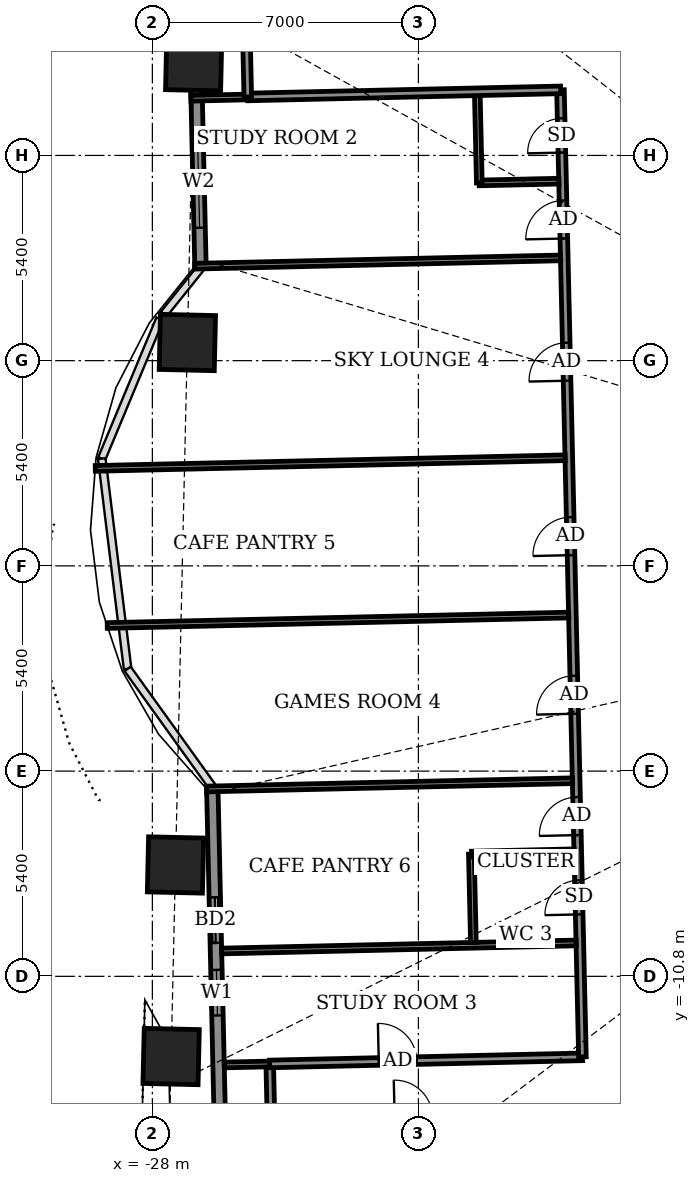
"""IFC4 building model, lengths in metres.
Left out: names, types, materials, properties, quantities, classifications, styles, units other than length and angle.
Written with IfcOpenShell. Run it as: python <this file> out.ifc"""

import sys

from ifc_helpers import new_model, si_unit, direction, frame, frame_2d, origin, origin_2d, place, context, subcontext, project, spatial, rectangle, extrude, element, fill, save


model = new_model("IFC4")
c1 = context("Model", 3, precision=1e-05, world=origin(), true_north=direction((0.0, 1.0)))
c2 = subcontext(c1, "Body", "Model", "MODEL_VIEW")
j1 = project(units=[si_unit("LENGTHUNIT", "METRE"), si_unit("PLANEANGLEUNIT", "RADIAN")], contexts=[c1])
p1 = place(None, origin())
s1 = spatial("IfcSite", under=j1, at=p1, CompositionType="ELEMENT")
p2 = place(p1, origin())
s2 = spatial("IfcBuilding", under=s1, at=p2, CompositionType="ELEMENT")
p3 = place(p2, frame((0.0, 0.0, 74.7)))
s3 = spatial("IfcBuildingStorey", under=s2, at=p3, CompositionType="ELEMENT", Elevation=74.7)
for number, where, z_axis, x_axis in (
    (1, (-27.391, -7.869, -0.55), (0.0, 0.0, 1.0), (-0.023, -1.0, 0.0)),
    (2, (-27.506, -12.909, -0.55), (0.0, 0.0, 1.0), (-0.023, -1.0, 0.0)),
    (3, (-26.912, 13.239, -0.55), (0.0, 0.0, 1.0), (-0.023, -1.0, 0.0)),
    (4, (-27.079, 5.877, -0.55), (0.0, 0.0, 1.0), (-0.023, -1.0, 0.0)),
):
    element("IfcColumn", number, at=place(p3, frame(where, z_axis=z_axis, x_axis=x_axis)), inside=s3, PredefinedType="COLUMN", context=c2, shape_type="SweptSolid", body=[
        extrude(rectangle(XDim=1.45, YDim=1.45, at=origin_2d()), origin(), (0.0, 0.0, 1.0), 4.6),
    ])
p4 = place(p3, frame((-27.036, 21.155, 0.0), z_axis=(0.0, 0.0, 1.0), x_axis=(0.022730142562, -0.999741636934, 0.0)))
e5 = element("IfcWall", 5, at=p4, inside=s3, PredefinedType="SOLIDWALL", context=c2, shape_type="SweptSolid", body=[
    extrude(rectangle(XDim=13.329, YDim=0.3, at=frame_2d((6.665, 0.0))), origin(), (0.0, 0.0, 1.0), 2.45),
])
p5 = place(p4, frame((3.813, 0.0, 0.0)))
e6 = element("IfcOpeningElement", 6, at=p5, cuts=e5, PredefinedType="OPENING", context=c2, shape_type="SweptSolid", body=[
    extrude(rectangle(XDim=1.5, YDim=2.4, at=frame_2d((0.75, 1.2))), frame((0.0, 0.16, 0.0), z_axis=(0.0, -1.0, 0.0), x_axis=(1.0, 0.0, 0.0)), (0.0, 0.0, 1.0), 0.32),
])
p6 = place(p4, frame((9.862, 0.0, 0.9)))
e7 = element("IfcOpeningElement", 7, at=p6, cuts=e5, PredefinedType="OPENING", context=c2, shape_type="SweptSolid", body=[
    extrude(rectangle(XDim=2.4, YDim=1.5, at=frame_2d((1.2, 0.75))), frame((0.0, 0.16, 0.0), z_axis=(0.0, -1.0, 0.0), x_axis=(1.0, 0.0, 0.0)), (0.0, 0.0, 1.0), 0.32),
])
p7 = place(p3, frame((-26.424, -5.808, 0.0), z_axis=(0.0, 0.0, 1.0), x_axis=(0.022654755793, -0.999743348085, 0.0)))
e8 = element("IfcWall", 8, at=p7, inside=s3, PredefinedType="SOLIDWALL", context=c2, shape_type="SweptSolid", body=[
    extrude(rectangle(XDim=13.729, YDim=0.3, at=frame_2d((6.865, 0.0))), origin(), (0.0, 0.0, 1.0), 2.45),
])
p8 = place(p7, frame((2.913, 0.0, 0.0)))
e9 = element("IfcOpeningElement", 9, at=p8, cuts=e8, PredefinedType="OPENING", context=c2, shape_type="SweptSolid", body=[
    extrude(rectangle(XDim=1.2, YDim=2.4, at=frame_2d((0.6, 1.2))), frame((0.0, 0.16, 0.0), z_axis=(0.0, -1.0, 0.0), x_axis=(1.0, 0.0, 0.0)), (0.0, 0.0, 1.0), 0.32),
])
p9 = place(p7, frame((4.823, 0.0, 0.9)))
e10 = element("IfcOpeningElement", 10, at=p9, cuts=e8, PredefinedType="OPENING", context=c2, shape_type="SweptSolid", body=[
    extrude(rectangle(XDim=1.2, YDim=1.5, at=frame_2d((0.6, 0.75))), frame((0.0, 0.16, 0.0), z_axis=(0.0, -1.0, 0.0), x_axis=(1.0, 0.0, 0.0)), (0.0, 0.0, 1.0), 0.32),
])
p10 = place(p7, frame((8.393, 0.0, 0.9)))
e11 = element("IfcOpeningElement", 11, at=p10, cuts=e8, PredefinedType="OPENING", context=c2, shape_type="SweptSolid", body=[
    extrude(rectangle(XDim=2.4, YDim=1.5, at=frame_2d((1.2, 0.75))), frame((0.0, 0.16, 0.0), z_axis=(0.0, -1.0, 0.0), x_axis=(1.0, 0.0, 0.0)), (0.0, 0.0, 1.0), 0.32),
])
p11 = place(p3, frame((-29.57, 10.945, 0.0), z_axis=(0.0, 0.0, 1.0), x_axis=(-0.022665943652, 0.999743094499, 0.0)))
e12 = element("IfcWall", 12, at=p11, inside=s3, PredefinedType="USERDEFINED", context=c2, shape_type="SweptSolid", body=[
    extrude(rectangle(XDim=6.0, YDim=0.55, at=frame_2d((3.0, 0.0))), origin(), (0.0, 0.0, 1.0), 0.8),
])
p12 = place(p3, frame((-29.116, -9.05, 0.0), z_axis=(0.0, 0.0, 1.0), x_axis=(-0.022590224177, 0.999744808324, 0.0)))
e13 = element("IfcWall", 13, at=p12, inside=s3, PredefinedType="USERDEFINED", context=c2, shape_type="SweptSolid", body=[
    extrude(rectangle(XDim=2.875, YDim=0.55, at=frame_2d((1.438, 0.0))), origin(), (0.0, 0.0, 1.0), 0.8),
])
p13 = place(p3, frame((-24.88, -14.605, 0.0), z_axis=(0.0, 0.0, 1.0), x_axis=(0.999742652859, 0.022685415006, 0.0)))
e14 = element("IfcWall", 14, at=p13, inside=s3, PredefinedType="PARTITIONING", context=c2, shape_type="SweptSolid", body=[
    extrude(rectangle(XDim=53.778, YDim=0.2, at=frame_2d((26.889, 0.0))), origin(), (0.0, 0.0, 1.0), 2.1),
])
p14 = place(p13, frame((3.256, 0.0, 0.0)))
e15 = element("IfcOpeningElement", 15, at=p14, cuts=e14, PredefinedType="OPENING", context=c2, shape_type="SweptSolid", body=[
    extrude(rectangle(XDim=1.0, YDim=2.1, at=frame_2d((0.5, 1.05))), frame((0.0, 0.11, 0.0), z_axis=(0.0, -1.0, 0.0), x_axis=(1.0, 0.0, 0.0)), (0.0, 0.0, 1.0), 0.22),
])
p15 = place(p13, frame((9.756, 0.0, 0.0)))
e16 = element("IfcOpeningElement", 16, at=p15, cuts=e14, PredefinedType="OPENING", context=c2, shape_type="SweptSolid", body=[
    extrude(rectangle(XDim=0.9, YDim=2.1, at=frame_2d((0.45, 1.05))), frame((0.0, 0.11, 0.0), z_axis=(0.0, -1.0, 0.0), x_axis=(1.0, 0.0, 0.0)), (0.0, 0.0, 1.0), 0.22),
])
p16 = place(p13, frame((15.131, 0.0, 0.0)))
e17 = element("IfcOpeningElement", 17, at=p16, cuts=e14, PredefinedType="OPENING", context=c2, shape_type="SweptSolid", body=[
    extrude(rectangle(XDim=1.0, YDim=2.1, at=frame_2d((0.5, 1.05))), frame((0.0, 0.11, 0.0), z_axis=(0.0, -1.0, 0.0), x_axis=(1.0, 0.0, 0.0)), (0.0, 0.0, 1.0), 0.22),
])
p17 = place(p13, frame((12.156, 0.0, 0.0)))
e18 = element("IfcOpeningElement", 18, at=p17, cuts=e14, PredefinedType="OPENING", context=c2, shape_type="SweptSolid", body=[
    extrude(rectangle(XDim=0.9, YDim=2.1, at=frame_2d((0.45, 1.05))), frame((0.0, 0.11, 0.0), z_axis=(0.0, -1.0, 0.0), x_axis=(1.0, 0.0, 0.0)), (0.0, 0.0, 1.0), 0.22),
])
p18 = place(p13, frame((18.006, 0.0, 0.0)))
e19 = element("IfcOpeningElement", 19, at=p18, cuts=e14, PredefinedType="OPENING", context=c2, shape_type="SweptSolid", body=[
    extrude(rectangle(XDim=1.0, YDim=2.1, at=frame_2d((0.5, 1.05))), frame((0.0, 0.11, 0.0), z_axis=(0.0, -1.0, 0.0), x_axis=(1.0, 0.0, 0.0)), (0.0, 0.0, 1.0), 0.22),
])
p19 = place(p13, frame((20.406, 0.0, 0.0)))
e20 = element("IfcOpeningElement", 20, at=p19, cuts=e14, PredefinedType="OPENING", context=c2, shape_type="SweptSolid", body=[
    extrude(rectangle(XDim=0.9, YDim=2.1, at=frame_2d((0.45, 1.05))), frame((0.0, 0.11, 0.0), z_axis=(0.0, -1.0, 0.0), x_axis=(1.0, 0.0, 0.0)), (0.0, 0.0, 1.0), 0.22),
])
p20 = place(p13, frame((25.331, 0.0, 0.0)))
e21 = element("IfcOpeningElement", 21, at=p20, cuts=e14, PredefinedType="OPENING", context=c2, shape_type="SweptSolid", body=[
    extrude(rectangle(XDim=0.9, YDim=2.1, at=frame_2d((0.45, 1.05))), frame((0.0, 0.11, 0.0), z_axis=(0.0, -1.0, 0.0), x_axis=(1.0, 0.0, 0.0)), (0.0, 0.0, 1.0), 0.22),
])
p21 = place(p13, frame((27.706, 0.0, 0.0)))
e22 = element("IfcOpeningElement", 22, at=p21, cuts=e14, PredefinedType="OPENING", context=c2, shape_type="SweptSolid", body=[
    extrude(rectangle(XDim=0.9, YDim=2.1, at=frame_2d((0.45, 1.05))), frame((0.0, 0.11, 0.0), z_axis=(0.0, -1.0, 0.0), x_axis=(1.0, 0.0, 0.0)), (0.0, 0.0, 1.0), 0.22),
])
p22 = place(p13, frame((34.881, 0.0, 0.0)))
e23 = element("IfcOpeningElement", 23, at=p22, cuts=e14, PredefinedType="OPENING", context=c2, shape_type="SweptSolid", body=[
    extrude(rectangle(XDim=0.9, YDim=2.1, at=frame_2d((0.45, 1.05))), frame((0.0, 0.11, 0.0), z_axis=(0.0, -1.0, 0.0), x_axis=(1.0, 0.0, 0.0)), (0.0, 0.0, 1.0), 0.22),
])
p23 = place(p13, frame((40.331, 0.0, 0.0)))
e24 = element("IfcOpeningElement", 24, at=p23, cuts=e14, PredefinedType="OPENING", context=c2, shape_type="SweptSolid", body=[
    extrude(rectangle(XDim=1.0, YDim=2.1, at=frame_2d((0.5, 1.05))), frame((0.0, 0.11, 0.0), z_axis=(0.0, -1.0, 0.0), x_axis=(1.0, 0.0, 0.0)), (0.0, 0.0, 1.0), 0.22),
])
p24 = place(p13, frame((50.842, 0.0, 0.0)))
e25 = element("IfcOpeningElement", 25, at=p24, cuts=e14, PredefinedType="OPENING", context=c2, shape_type="SweptSolid", body=[
    extrude(rectangle(XDim=1.0, YDim=2.1, at=frame_2d((0.5, 1.05))), frame((0.0, 0.11, 0.0), z_axis=(0.0, -1.0, 0.0), x_axis=(1.0, 0.0, 0.0)), (0.0, 0.0, 1.0), 0.22),
])
p25 = place(p13, frame((45.856, 0.0, 0.0)))
e26 = element("IfcOpeningElement", 26, at=p25, cuts=e14, PredefinedType="OPENING", context=c2, shape_type="SweptSolid", body=[
    extrude(rectangle(XDim=0.9, YDim=2.1, at=frame_2d((0.45, 1.05))), frame((0.0, 0.11, 0.0), z_axis=(0.0, -1.0, 0.0), x_axis=(1.0, 0.0, 0.0)), (0.0, 0.0, 1.0), 0.22),
])
p26 = place(p3, frame((-24.878, -14.605, 0.0), z_axis=(0.0, 0.0, 1.0), x_axis=(-0.022780545013, 0.999740489712, 0.0)))
e27 = element("IfcWall", 27, at=p26, inside=s3, PredefinedType="PARTITIONING", context=c2, shape_type="SweptSolid", body=[
    extrude(rectangle(XDim=1.5, YDim=0.2, at=frame_2d((0.75, 0.0))), origin(), (0.0, 0.0, 1.0), 2.55),
])
p27 = place(p3, frame((-26.108, -13.132, 0.0), z_axis=(0.0, 0.0, 1.0), x_axis=(0.999744249074, 0.022614960597, 0.0)))
e28 = element("IfcWall", 28, at=p27, inside=s3, PredefinedType="PARTITIONING", context=c2, shape_type="SweptSolid", body=[
    extrude(rectangle(XDim=1.198, YDim=0.15, at=frame_2d((0.599, 0.0))), origin(), (0.0, 0.0, 1.0), 2.55),
])
p28 = place(p3, frame((-24.914, -13.105, 0.0), z_axis=(0.0, 0.0, 1.0), x_axis=(0.999742248516, 0.022703227368, 0.0)))
e29 = element("IfcWall", 29, at=p28, inside=s3, PredefinedType="PARTITIONING", context=c2, shape_type="SweptSolid", body=[
    extrude(rectangle(XDim=8.237, YDim=0.2, at=frame_2d((4.119, 0.0))), origin(), (0.0, 0.0, 1.0), 2.45),
])
p29 = place(p28, frame((2.872, 0.0, 0.0)))
e30 = element("IfcOpeningElement", 30, at=p29, cuts=e29, PredefinedType="OPENING", context=c2, shape_type="SweptSolid", body=[
    extrude(rectangle(XDim=1.0, YDim=2.1, at=frame_2d((0.5, 1.05))), frame((0.0, 0.11, 0.0), z_axis=(0.0, -1.0, 0.0), x_axis=(1.0, 0.0, 0.0)), (0.0, 0.0, 1.0), 0.22),
])
p30 = place(p3, frame((-16.684, -12.919, 0.0), z_axis=(0.0, 0.0, 1.0), x_axis=(-0.022706151961, 0.999742182097, 0.0)))
e31 = element("IfcWall", 31, at=p30, inside=s3, PredefinedType="PARTITIONING", context=c2, shape_type="SweptSolid", body=[
    extrude(rectangle(XDim=25.45, YDim=0.2, at=frame_2d((12.725, 0.0))), origin(), (0.0, 0.0, 1.0), 2.45),
])
p31 = place(p30, frame((21.538, 0.0, 0.0)))
e32 = element("IfcOpeningElement", 32, at=p31, cuts=e31, PredefinedType="OPENING", context=c2, shape_type="SweptSolid", body=[
    extrude(rectangle(XDim=1.0, YDim=2.1, at=frame_2d((0.5, 1.05))), frame((0.0, 0.11, 0.0), z_axis=(0.0, -1.0, 0.0), x_axis=(1.0, 0.0, 0.0)), (0.0, 0.0, 1.0), 0.22),
])
p32 = place(p30, frame((23.8, 0.0, 0.0)))
e33 = element("IfcOpeningElement", 33, at=p32, cuts=e31, PredefinedType="OPENING", context=c2, shape_type="SweptSolid", body=[
    extrude(rectangle(XDim=0.9, YDim=2.1, at=frame_2d((0.45, 1.05))), frame((0.0, 0.11, 0.0), z_axis=(0.0, -1.0, 0.0), x_axis=(1.0, 0.0, 0.0)), (0.0, 0.0, 1.0), 0.22),
])
p33 = place(p30, frame((17.796, 0.0, 0.0)))
e34 = element("IfcOpeningElement", 34, at=p33, cuts=e31, PredefinedType="OPENING", context=c2, shape_type="SweptSolid", body=[
    extrude(rectangle(XDim=1.0, YDim=2.1, at=frame_2d((0.5, 1.05))), frame((0.0, 0.11, 0.0), z_axis=(0.0, -1.0, 0.0), x_axis=(1.0, 0.0, 0.0)), (0.0, 0.0, 1.0), 0.22),
])
p34 = place(p30, frame((13.205, 0.0, 0.0)))
e35 = element("IfcOpeningElement", 35, at=p34, cuts=e31, PredefinedType="OPENING", context=c2, shape_type="SweptSolid", body=[
    extrude(rectangle(XDim=1.0, YDim=2.1, at=frame_2d((0.5, 1.05))), frame((0.0, 0.11, 0.0), z_axis=(0.0, -1.0, 0.0), x_axis=(1.0, 0.0, 0.0)), (0.0, 0.0, 1.0), 0.22),
])
p35 = place(p30, frame((9.031, 0.0, 0.0)))
e36 = element("IfcOpeningElement", 36, at=p35, cuts=e31, PredefinedType="OPENING", context=c2, shape_type="SweptSolid", body=[
    extrude(rectangle(XDim=1.0, YDim=2.1, at=frame_2d((0.5, 1.05))), frame((0.0, 0.11, 0.0), z_axis=(0.0, -1.0, 0.0), x_axis=(1.0, 0.0, 0.0)), (0.0, 0.0, 1.0), 0.22),
])
p36 = place(p30, frame((5.837, 0.0, 0.0)))
e37 = element("IfcOpeningElement", 37, at=p36, cuts=e31, PredefinedType="OPENING", context=c2, shape_type="SweptSolid", body=[
    extrude(rectangle(XDim=1.0, YDim=2.1, at=frame_2d((0.5, 1.05))), frame((0.0, 0.11, 0.0), z_axis=(0.0, -1.0, 0.0), x_axis=(1.0, 0.0, 0.0)), (0.0, 0.0, 1.0), 0.22),
])
p37 = place(p30, frame((3.75, 0.0, 0.0)))
e38 = element("IfcOpeningElement", 38, at=p37, cuts=e31, PredefinedType="OPENING", context=c2, shape_type="SweptSolid", body=[
    extrude(rectangle(XDim=0.9, YDim=2.1, at=frame_2d((0.45, 1.05))), frame((0.0, 0.11, 0.0), z_axis=(0.0, -1.0, 0.0), x_axis=(1.0, 0.0, 0.0)), (0.0, 0.0, 1.0), 0.22),
])
p38 = place(p3, frame((-26.176, -10.133, 0.0), z_axis=(0.0, 0.0, 1.0), x_axis=(0.999741511276, 0.022735668724, 0.0)))
e39 = element("IfcWall", 39, at=p38, inside=s3, PredefinedType="PARTITIONING", context=c2, shape_type="SweptSolid", body=[
    extrude(rectangle(XDim=9.332, YDim=0.15, at=frame_2d((4.666, 0.0))), origin(), (0.0, 0.0, 1.0), 2.55),
])
p39 = place(p3, frame((-19.553, -9.908, 0.0), z_axis=(0.0, 0.0, 1.0), x_axis=(-0.022781023197, 0.999740478815, 0.0)))
e40 = element("IfcWall", 40, at=p39, inside=s3, PredefinedType="PARTITIONING", context=c2, shape_type="SweptSolid", body=[
    extrude(rectangle(XDim=2.325, YDim=0.15, at=frame_2d((1.163, 0.0))), origin(), (0.0, 0.0, 1.0), 2.55),
])
p40 = place(p3, frame((-19.601, -7.583, 0.0), z_axis=(0.0, 0.0, 1.0), x_axis=(0.999744396973, 0.02260842146, 0.0)))
e41 = element("IfcWall", 41, at=p40, inside=s3, PredefinedType="PARTITIONING", context=c2, shape_type="SweptSolid", body=[
    extrude(rectangle(XDim=2.7, YDim=0.15, at=frame_2d((1.35, 0.0))), origin(), (0.0, 0.0, 1.0), 4.05),
])
p41 = place(p3, frame((-26.573, -5.871, 0.0), z_axis=(0.0, 0.0, 1.0), x_axis=(0.999743768709, 0.022636186244, 0.0)))
e42 = element("IfcWall", 42, at=p41, inside=s3, PredefinedType="PARTITIONING", context=c2, shape_type="SweptSolid", body=[
    extrude(rectangle(XDim=9.631, YDim=0.15, at=frame_2d((4.816, 0.0))), origin(), (0.0, 0.0, 1.0), 2.75),
])
p42 = place(p3, frame((-29.188, -1.569, 0.0), z_axis=(0.0, 0.0, 1.0), x_axis=(0.999743472241, 0.022649276187, 0.0)))
e43 = element("IfcWall", 43, at=p42, inside=s3, PredefinedType="PARTITIONING", context=c2, shape_type="SweptSolid", body=[
    extrude(rectangle(XDim=12.148, YDim=0.15, at=frame_2d((6.074, 0.0))), origin(), (0.0, 0.0, 1.0), 0.93),
])
p43 = place(p3, frame((-29.502, 2.565, 0.0), z_axis=(0.0, 0.0, 1.0), x_axis=(0.999743656464, 0.022641143088, 0.0)))
e44 = element("IfcWall", 44, at=p43, inside=s3, PredefinedType="PARTITIONING", context=c2, shape_type="SweptSolid", body=[
    extrude(rectangle(XDim=12.368, YDim=0.15, at=frame_2d((6.184, 0.0))), origin(), (0.0, 0.0, 1.0), 0.93),
])
p44 = place(p3, frame((-26.885, 7.885, 0.0), z_axis=(0.0, 0.0, 1.0), x_axis=(0.999741468995, 0.022737527832, 0.0)))
e45 = element("IfcWall", 45, at=p44, inside=s3, PredefinedType="PARTITIONING", context=c2, shape_type="SweptSolid", body=[
    extrude(rectangle(XDim=9.631, YDim=0.15, at=frame_2d((4.816, 0.0))), origin(), (0.0, 0.0, 1.0), 2.45),
])
p45 = place(p3, frame((-19.402, 10.076, 0.0), z_axis=(0.0, 0.0, 1.0), x_axis=(0.999748393524, 0.022430997437, 0.0)))
e46 = element("IfcWall", 46, at=p45, inside=s3, PredefinedType="PARTITIONING", context=c2, shape_type="SweptSolid", body=[
    extrude(rectangle(XDim=2.101, YDim=0.15, at=frame_2d((1.05, 0.0))), origin(), (0.0, 0.0, 1.0), 2.75),
])
p46 = place(p3, frame((-19.397, 10.076, 0.0), z_axis=(0.0, 0.0, 1.0), x_axis=(-0.022612884682, 0.999744296031, 0.0)))
e47 = element("IfcWall", 47, at=p46, inside=s3, PredefinedType="PARTITIONING", context=c2, shape_type="SweptSolid", body=[
    extrude(rectangle(XDim=2.3, YDim=0.15, at=frame_2d((1.15, 0.0))), origin(), (0.0, 0.0, 1.0), 2.75),
])
p47 = place(p3, frame((-26.985, 12.304, 0.0), z_axis=(0.0, 0.0, 1.0), x_axis=(0.999743515105, 0.022647384061, 0.0)))
e48 = element("IfcWall", 48, at=p47, inside=s3, PredefinedType="PARTITIONING", context=c2, shape_type="SweptSolid", body=[
    extrude(rectangle(XDim=1.499, YDim=0.15, at=frame_2d((0.749, 0.0))), origin(), (0.0, 0.0, 1.0), 2.45),
])
p48 = place(p3, frame((-25.491, 12.338, 0.0), z_axis=(0.0, 0.0, 1.0), x_axis=(0.999742172114, 0.022706591468, 0.0)))
e49 = element("IfcWall", 49, at=p48, inside=s3, PredefinedType="PARTITIONING", context=c2, shape_type="SweptSolid", body=[
    extrude(rectangle(XDim=8.236, YDim=0.2, at=frame_2d((4.118, 0.0))), origin(), (0.0, 0.0, 1.0), 2.75),
])
p49 = place(p3, frame((-25.489, 12.338, 0.0), z_axis=(0.0, 0.0, 1.0), x_axis=(-0.022617910375, 0.999744182344, 0.0)))
e50 = element("IfcWall", 50, at=p49, inside=s3, PredefinedType="PARTITIONING", context=c2, shape_type="SweptSolid", body=[
    extrude(rectangle(XDim=1.5, YDim=0.2, at=frame_2d((0.75, 0.0))), origin(), (0.0, 0.0, 1.0), 2.75),
])
p50 = place(p6, origin())
e51 = element("IfcWindow", 51, at=p50, inside=s3, PartitioningType="DOUBLE_PANEL_VERTICAL", PredefinedType="WINDOW", context=c2, shape_type="SweptSolid", body=[
    extrude(rectangle(XDim=2.4, YDim=1.5, at=frame_2d((1.2, 0.75))), frame((0.0, 0.03, 0.0), z_axis=(0.0, -1.0, 0.0), x_axis=(1.0, 0.0, 0.0)), (0.0, 0.0, 1.0), 0.06),
])
fill(e7, e51)
p51 = place(p8, origin())
e52 = element("IfcDoor", 52, at=p51, inside=s3, OperationType="SLIDING_TO_LEFT", PredefinedType="DOOR", context=c2, shape_type="SweptSolid", body=[
    extrude(rectangle(XDim=1.2, YDim=2.4, at=frame_2d((0.6, 1.2))), frame((0.0, 0.025, 0.0), z_axis=(0.0, -1.0, 0.0), x_axis=(1.0, 0.0, 0.0)), (0.0, 0.0, 1.0), 0.05),
])
fill(e9, e52)
p52 = place(p9, origin())
e53 = element("IfcWindow", 53, at=p52, inside=s3, PartitioningType="SINGLE_PANEL", PredefinedType="WINDOW", context=c2, shape_type="SweptSolid", body=[
    extrude(rectangle(XDim=1.2, YDim=1.5, at=frame_2d((0.6, 0.75))), frame((0.0, 0.03, 0.0), z_axis=(0.0, -1.0, 0.0), x_axis=(1.0, 0.0, 0.0)), (0.0, 0.0, 1.0), 0.06),
])
fill(e10, e53)
p53 = place(p31, origin())
e54 = element("IfcDoor", 54, at=p53, inside=s3, OperationType="SINGLE_SWING_RIGHT", PredefinedType="DOOR", context=c2, shape_type="SweptSolid", body=[
    extrude(rectangle(XDim=1.0, YDim=2.1, at=frame_2d((0.5, 1.05))), frame((0.0, 0.025, 0.0), z_axis=(0.0, -1.0, 0.0), x_axis=(1.0, 0.0, 0.0)), (0.0, 0.0, 1.0), 0.05),
])
fill(e32, e54)
p54 = place(p32, origin())
e55 = element("IfcDoor", 55, at=p54, inside=s3, OperationType="SINGLE_SWING_LEFT", PredefinedType="DOOR", context=c2, shape_type="SweptSolid", body=[
    extrude(rectangle(XDim=0.9, YDim=2.1, at=frame_2d((0.45, 1.05))), frame((0.0, 0.025, 0.0), z_axis=(0.0, -1.0, 0.0), x_axis=(1.0, 0.0, 0.0)), (0.0, 0.0, 1.0), 0.05),
])
fill(e33, e55)
p55 = place(p33, origin())
e56 = element("IfcDoor", 56, at=p55, inside=s3, OperationType="SINGLE_SWING_LEFT", PredefinedType="DOOR", context=c2, shape_type="SweptSolid", body=[
    extrude(rectangle(XDim=1.0, YDim=2.1, at=frame_2d((0.5, 1.05))), frame((0.0, 0.025, 0.0), z_axis=(0.0, -1.0, 0.0), x_axis=(1.0, 0.0, 0.0)), (0.0, 0.0, 1.0), 0.05),
])
fill(e34, e56)
p56 = place(p34, origin())
e57 = element("IfcDoor", 57, at=p56, inside=s3, OperationType="SINGLE_SWING_RIGHT", PredefinedType="DOOR", context=c2, shape_type="SweptSolid", body=[
    extrude(rectangle(XDim=1.0, YDim=2.1, at=frame_2d((0.5, 1.05))), frame((0.0, 0.025, 0.0), z_axis=(0.0, -1.0, 0.0), x_axis=(1.0, 0.0, 0.0)), (0.0, 0.0, 1.0), 0.05),
])
fill(e35, e57)
p57 = place(p35, origin())
e58 = element("IfcDoor", 58, at=p57, inside=s3, OperationType="SINGLE_SWING_LEFT", PredefinedType="DOOR", context=c2, shape_type="SweptSolid", body=[
    extrude(rectangle(XDim=1.0, YDim=2.1, at=frame_2d((0.5, 1.05))), frame((0.0, 0.025, 0.0), z_axis=(0.0, -1.0, 0.0), x_axis=(1.0, 0.0, 0.0)), (0.0, 0.0, 1.0), 0.05),
])
fill(e36, e58)
p58 = place(p36, origin())
e59 = element("IfcDoor", 59, at=p58, inside=s3, OperationType="SINGLE_SWING_RIGHT", PredefinedType="DOOR", context=c2, shape_type="SweptSolid", body=[
    extrude(rectangle(XDim=1.0, YDim=2.1, at=frame_2d((0.5, 1.05))), frame((0.0, 0.025, 0.0), z_axis=(0.0, -1.0, 0.0), x_axis=(1.0, 0.0, 0.0)), (0.0, 0.0, 1.0), 0.05),
])
fill(e37, e59)
p59 = place(p37, origin())
e60 = element("IfcDoor", 60, at=p59, inside=s3, OperationType="SINGLE_SWING_RIGHT", PredefinedType="DOOR", context=c2, shape_type="SweptSolid", body=[
    extrude(rectangle(XDim=0.9, YDim=2.1, at=frame_2d((0.45, 1.05))), frame((0.0, 0.025, 0.0), z_axis=(0.0, -1.0, 0.0), x_axis=(1.0, 0.0, 0.0)), (0.0, 0.0, 1.0), 0.05),
])
fill(e38, e60)
p60 = place(p29, origin())
e61 = element("IfcDoor", 61, at=p60, inside=s3, OperationType="SINGLE_SWING_LEFT", PredefinedType="DOOR", context=c2, shape_type="SweptSolid", body=[
    extrude(rectangle(XDim=1.0, YDim=2.1, at=frame_2d((0.5, 1.05))), frame((0.0, 0.025, 0.0), z_axis=(0.0, -1.0, 0.0), x_axis=(1.0, 0.0, 0.0)), (0.0, 0.0, 1.0), 0.05),
])
fill(e30, e61)
save(model, sys.argv[1])
